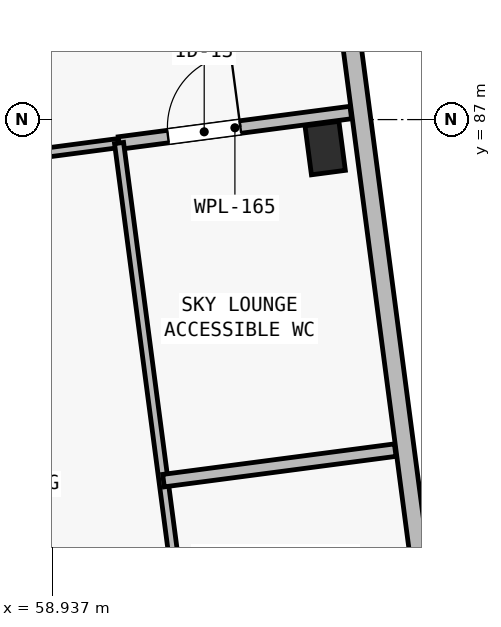
"""IFC4 building model, lengths in metres.
Left out: names, types, materials, properties, quantities, classifications, styles, units other than length and angle.
Written with IfcOpenShell. Run it as: python <this file> out.ifc"""

import sys

from ifc_helpers import new_model, si_unit, direction, frame, frame_2d, origin, origin_2d, place, context, subcontext, project, spatial, rectangle, extrude, element, fill, save


model = new_model("IFC4")
c1 = context("Model", 3, precision=1e-05, world=origin(), true_north=direction((0.0, 1.0)))
c2 = subcontext(c1, "Body", "Model", "MODEL_VIEW")
j1 = project(units=[si_unit("LENGTHUNIT", "METRE"), si_unit("PLANEANGLEUNIT", "RADIAN")], contexts=[c1])
p1 = place(None, origin())
s1 = spatial("IfcSite", under=j1, at=p1, CompositionType="ELEMENT")
p2 = place(p1, origin())
s2 = spatial("IfcBuilding", under=s1, at=p2, CompositionType="ELEMENT")
p3 = place(p2, frame((0.0, 0.0, 27.9)))
s3 = spatial("IfcBuildingStorey", under=s2, at=p3, CompositionType="ELEMENT", Elevation=27.9)
p4 = place(p3, frame((62.53, 86.625, 0.0), z_axis=(0.0, 0.0, 1.0), x_axis=(0.991444861374, 0.13052619222, 0.0)))
e1 = element("IfcColumn", 1, at=p4, inside=s3, PredefinedType="COLUMN", context=c2, shape_type="SweptSolid", body=[
    extrude(rectangle(XDim=0.45, YDim=0.65, at=origin_2d()), origin(), (0.0, 0.0, 1.0), 3.25),
])
p5 = place(p3, frame((61.39, 99.31, 0.0), z_axis=(0.0, 0.0, 1.0), x_axis=(0.13052411616, -0.99144513469, 0.0)))
e2 = element("IfcWall", 2, at=p5, inside=s3, PredefinedType="SOLIDWALL", context=c2, shape_type="SweptSolid", body=[
    extrude(rectangle(XDim=21.05, YDim=0.24, at=frame_2d((10.525, 0.0))), origin(), (0.0, 0.0, 1.0), 3.0),
])
p6 = place(p5, frame((2.45, 0.0, 0.45)))
e3 = element("IfcOpeningElement", 3, at=p6, cuts=e2, PredefinedType="OPENING", context=c2, shape_type="SweptSolid", body=[
    extrude(rectangle(XDim=0.62, YDim=2.28, at=frame_2d((0.31, 1.14))), frame((0.0, 0.135, 0.0), z_axis=(0.0, -1.0, 0.0), x_axis=(1.0, 0.0, 0.0)), (0.0, 0.0, 1.0), 0.27),
])
p7 = place(p3, frame((53.984, 85.924, 0.0), z_axis=(0.0, 0.0, 1.0), x_axis=(0.991446810256, 0.130511388136, 0.0)))
e4 = element("IfcWall", 4, at=p7, inside=s3, PredefinedType="PARTITIONING", context=c2, shape_type="SweptSolid", body=[
    extrude(rectangle(XDim=5.885, YDim=0.12, at=frame_2d((2.942, 0.0))), origin(), (0.0, 0.0, 1.0), 2.97),
])
p8 = place(p7, frame((1.15, 0.0, 0.0)))
e5 = element("IfcOpeningElement", 5, at=p8, cuts=e4, PredefinedType="OPENING", context=c2, shape_type="SweptSolid", body=[
    extrude(rectangle(XDim=1.15, YDim=2.15, at=frame_2d((0.575, 1.075))), frame((0.0, 0.075, 0.0), z_axis=(0.0, -1.0, 0.0), x_axis=(1.0, 0.0, 0.0)), (0.0, 0.0, 1.0), 0.15),
])
p9 = place(p3, frame((59.818, 86.692, 0.0), z_axis=(0.0, 0.0, 1.0), x_axis=(0.991444293548, 0.130530505213, 0.0)))
e6 = element("IfcWall", 6, at=p9, inside=s3, PredefinedType="PLUMBINGWALL", context=c2, shape_type="SweptSolid", body=[
    extrude(rectangle(XDim=3.075, YDim=0.165, at=frame_2d((1.538, 0.0))), origin(), (0.0, 0.0, 1.0), 2.97),
])
p10 = place(p9, frame((0.65, 0.0, 0.0)))
e7 = element("IfcOpeningElement", 7, at=p10, cuts=e6, PredefinedType="OPENING", context=c2, shape_type="SweptSolid", body=[
    extrude(rectangle(XDim=0.96, YDim=2.12, at=frame_2d((0.48, 1.06))), frame((0.0, 0.097, 0.0), z_axis=(0.0, -1.0, 0.0), x_axis=(1.0, 0.0, 0.0)), (0.0, 0.0, 1.0), 0.195),
])
p11 = place(p3, frame((60.942, 78.155, 0.0), z_axis=(0.0, 0.0, 1.0), x_axis=(-0.13051979335, 0.99144570378, 0.0)))
e8 = element("IfcWall", 8, at=p11, inside=s3, PredefinedType="PARTITIONING", context=c2, shape_type="SweptSolid", body=[
    extrude(rectangle(XDim=8.61, YDim=0.12, at=frame_2d((4.305, 0.0))), origin(), (0.0, 0.0, 1.0), 2.97),
])
p12 = place(p11, frame((1.25, 0.0, 0.0)))
e9 = element("IfcOpeningElement", 9, at=p12, cuts=e8, PredefinedType="OPENING", context=c2, shape_type="SweptSolid", body=[
    extrude(rectangle(XDim=0.88, YDim=2.1, at=frame_2d((0.44, 1.05))), frame((0.0, 0.075, 0.0), z_axis=(0.0, -1.0, 0.0), x_axis=(1.0, 0.0, 0.0)), (0.0, 0.0, 1.0), 0.15),
])
p13 = place(p3, frame((60.403, 82.25, 0.0), z_axis=(0.0, 0.0, 1.0), x_axis=(0.991444293548, 0.130530505213, 0.0)))
e10 = element("IfcWall", 10, at=p13, inside=s3, PredefinedType="PLUMBINGWALL", context=c2, shape_type="SweptSolid", body=[
    extrude(rectangle(XDim=3.075, YDim=0.165, at=frame_2d((1.538, 0.0))), origin(), (0.0, 0.0, 1.0), 2.97),
])
p14 = place(p10, origin())
e11 = element("IfcDoor", 11, at=p14, inside=s3, OperationType="SINGLE_SWING_RIGHT", PredefinedType="DOOR", context=c2, shape_type="SweptSolid", body=[
    extrude(rectangle(XDim=0.96, YDim=2.12, at=frame_2d((0.48, 1.06))), frame((0.0, 0.025, 0.0), z_axis=(0.0, -1.0, 0.0), x_axis=(1.0, 0.0, 0.0)), (0.0, 0.0, 1.0), 0.05),
])
fill(e7, e11)
save(model, sys.argv[1])
